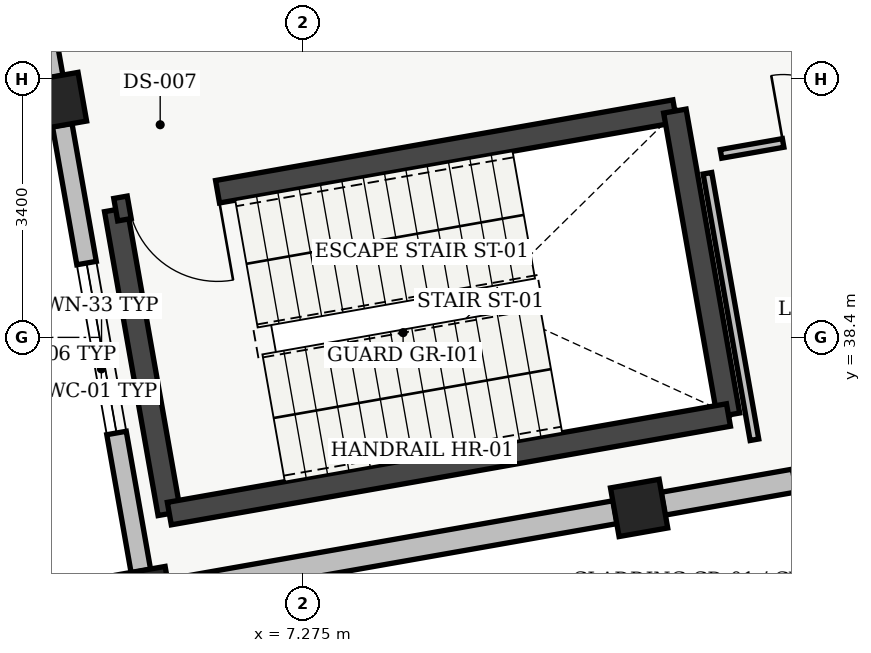
"""IFC4 building model, lengths in metres.
Left out: names, types, materials, properties, quantities, classifications, styles, units other than length and angle.
Written with IfcOpenShell. Run it as: python <this file> out.ifc"""

import sys

from ifc_helpers import new_model, si_unit, direction, frame, frame_2d, origin, origin_2d, place, context, subcontext, project, spatial, rectangle, extrude, element, fill, save


model = new_model("IFC4")
c1 = context("Model", 3, precision=1e-05, world=origin(), true_north=direction((0.0, 1.0)))
c2 = subcontext(c1, "Body", "Model", "MODEL_VIEW")
j1 = project(units=[si_unit("LENGTHUNIT", "METRE"), si_unit("PLANEANGLEUNIT", "RADIAN")], contexts=[c1])
p1 = place(None, origin())
s1 = spatial("IfcSite", under=j1, at=p1, CompositionType="ELEMENT")
p2 = place(p1, origin())
s2 = spatial("IfcBuilding", under=s1, at=p2, CompositionType="ELEMENT")
p3 = place(p2, frame((0.0, 0.0, 23.1)))
s3 = spatial("IfcBuildingStorey", under=s2, at=p3, CompositionType="ELEMENT", Elevation=23.1)
for number, where, z_axis, x_axis in (
    (1, (5.2, 35.01, 0.0), (0.0, 0.0, 1.0), (0.985, 0.174, 0.0)),
    (2, (4.054, 41.51, 0.0), (0.0, 0.0, 1.0), (0.985, 0.174, 0.0)),
    (3, (11.7, 36.156, 0.0), (0.0, 0.0, 1.0), (0.985, 0.174, 0.0)),
):
    element("IfcColumn", number, at=place(p3, frame(where, z_axis=z_axis, x_axis=x_axis)), inside=s3, PredefinedType="COLUMN", context=c2, shape_type="SweptSolid", body=[
        extrude(rectangle(XDim=0.65, YDim=0.65, at=origin_2d()), origin(), (0.0, 0.0, 1.0), 4.31),
    ])
p4 = place(p3, frame((5.145, 35.325, 0.0), z_axis=(0.0, 0.0, 1.0), x_axis=(-0.17368484894, 0.984801286173, 0.0)))
e4 = element("IfcWall", 4, at=p4, inside=s3, PredefinedType="STANDARD", context=c2, shape_type="SweptSolid", body=[
    extrude(rectangle(XDim=5.96, YDim=0.26, at=frame_2d((2.98, 0.0))), origin(), (0.0, 0.0, 1.0), 3.795),
])
p5 = place(p4, frame((1.845, 0.0, 0.95)))
e5 = element("IfcOpeningElement", 5, at=p5, cuts=e4, PredefinedType="OPENING", context=c2, shape_type="SweptSolid", body=[
    extrude(rectangle(XDim=2.27, YDim=1.48, at=frame_2d((1.135, 0.74))), frame((0.0, 0.13, 0.0), z_axis=(0.0, -1.0, 0.0), x_axis=(1.0, 0.0, 0.0)), (0.0, 0.0, 1.0), 0.26),
])
p6 = place(p3, frame((3.998, 41.825, 0.0), z_axis=(0.0, 0.0, 1.0), x_axis=(-0.173645120828, 0.98480829201, 0.0)))
e6 = element("IfcWall", 6, at=p6, inside=s3, PredefinedType="STANDARD", context=c2, shape_type="SweptSolid", body=[
    extrude(rectangle(XDim=5.96, YDim=0.245, at=frame_2d((2.98, 0.0))), origin(), (0.0, 0.0, 1.0), 3.795),
])
p7 = place(p6, frame((1.8, 0.0, 0.95)))
e7 = element("IfcOpeningElement", 7, at=p7, cuts=e6, PredefinedType="OPENING", context=c2, shape_type="SweptSolid", body=[
    extrude(rectangle(XDim=2.36, YDim=1.36, at=frame_2d((1.18, 0.68))), frame((0.0, 0.123, 0.0), z_axis=(0.0, -1.0, 0.0), x_axis=(1.0, 0.0, 0.0)), (0.0, 0.0, 1.0), 0.245),
])
p8 = place(p3, frame((17.884, 37.247, 0.0), z_axis=(0.0, 0.0, 1.0), x_axis=(-0.98480829201, -0.173645120828, 0.0)))
e8 = element("IfcWall", 8, at=p8, inside=s3, PredefinedType="STANDARD", context=c2, shape_type="SweptSolid", body=[
    extrude(rectangle(XDim=5.96, YDim=0.305, at=frame_2d((2.98, 0.0))), origin(), (0.0, 0.0, 1.0), 3.795),
])
p9 = place(p8, frame((1.755, 0.0, 0.95)))
e9 = element("IfcOpeningElement", 9, at=p9, cuts=e8, PredefinedType="OPENING", context=c2, shape_type="SweptSolid", body=[
    extrude(rectangle(XDim=2.45, YDim=1.38, at=frame_2d((1.225, 0.69))), frame((0.0, 0.152, 0.0), z_axis=(0.0, -1.0, 0.0), x_axis=(1.0, 0.0, 0.0)), (0.0, 0.0, 1.0), 0.305),
])
p10 = place(p3, frame((11.385, 36.101, 0.0), z_axis=(0.0, 0.0, 1.0), x_axis=(-0.98480829201, -0.173645120828, 0.0)))
e10 = element("IfcWall", 10, at=p10, inside=s3, PredefinedType="STANDARD", context=c2, shape_type="SweptSolid", body=[
    extrude(rectangle(XDim=5.96, YDim=0.305, at=frame_2d((2.98, 0.0))), origin(), (0.0, 0.0, 1.0), 3.795),
])
p11 = place(p3, frame((5.519, 36.082, 0.0), z_axis=(0.0, 0.0, 1.0), x_axis=(-0.173665267602, 0.984804739443, 0.0)))
e11 = element("IfcWall", 11, at=p11, inside=s3, PredefinedType="SHEAR", context=c2, shape_type="SweptSolid", body=[
    extrude(rectangle(XDim=4.06, YDim=0.3, at=frame_2d((2.03, 0.0))), origin(), (0.0, 0.0, 1.0), 4.28),
])
p12 = place(p3, frame((4.814, 40.08, 0.0), z_axis=(0.0, 0.0, 1.0), x_axis=(0.984802636214, 0.173677193974, 0.0)))
e12 = element("IfcWall", 12, at=p12, inside=s3, PredefinedType="SHEAR", context=c2, shape_type="SweptSolid", body=[
    extrude(rectangle(XDim=7.47, YDim=0.3, at=frame_2d((3.735, 0.0))), origin(), (0.0, 0.0, 1.0), 4.28),
])
p13 = place(p12, frame((0.18, 0.0, 0.0)))
e13 = element("IfcOpeningElement", 13, at=p13, cuts=e12, PredefinedType="OPENING", context=c2, shape_type="SweptSolid", body=[
    extrude(rectangle(XDim=1.18, YDim=2.15, at=frame_2d((0.59, 1.075))), frame((0.0, 0.15, 0.0), z_axis=(0.0, -1.0, 0.0), x_axis=(1.0, 0.0, 0.0)), (0.0, 0.0, 1.0), 0.3),
])
p14 = place(p3, frame((12.17, 41.377, 0.0), z_axis=(0.0, 0.0, 1.0), x_axis=(0.173654983803, -0.984806552883, 0.0)))
e14 = element("IfcWall", 14, at=p14, inside=s3, PredefinedType="SHEAR", context=c2, shape_type="SweptSolid", body=[
    extrude(rectangle(XDim=4.06, YDim=0.3, at=frame_2d((2.03, 0.0))), origin(), (0.0, 0.0, 1.0), 4.28),
])
p15 = place(p3, frame((12.875, 37.379, 0.0), z_axis=(0.0, 0.0, 1.0), x_axis=(-0.984808225754, -0.173645496596, 0.0)))
e15 = element("IfcWall", 15, at=p15, inside=s3, PredefinedType="SHEAR", context=c2, shape_type="SweptSolid", body=[
    extrude(rectangle(XDim=7.47, YDim=0.3, at=frame_2d((3.735, 0.0))), origin(), (0.0, 0.0, 1.0), 4.28),
])
p16 = place(p3, frame((15.298, 41.259, 0.0), z_axis=(0.0, 0.0, 1.0), x_axis=(-0.984803714572, -0.17367107924, 0.0)))
e16 = element("IfcWall", 16, at=p16, inside=s3, PredefinedType="PARTITIONING", context=c2, shape_type="SweptSolid", body=[
    extrude(rectangle(XDim=2.56, YDim=0.115, at=frame_2d((1.28, 0.0))), origin(), (0.0, 0.0, 1.0), 3.95),
])
p17 = place(p16, frame((0.83, 0.0, 0.0)))
e17 = element("IfcOpeningElement", 17, at=p17, cuts=e16, PredefinedType="OPENING", context=c2, shape_type="SweptSolid", body=[
    extrude(rectangle(XDim=0.9, YDim=2.1, at=frame_2d((0.45, 1.05))), frame((0.0, 0.058, 0.0), z_axis=(0.0, -1.0, 0.0), x_axis=(1.0, 0.0, 0.0)), (0.0, 0.0, 1.0), 0.115),
])
p18 = place(p3, frame((12.599, 40.559, 0.0), z_axis=(0.0, 0.0, 1.0), x_axis=(0.173644490041, -0.984808403233, 0.0)))
e18 = element("IfcWall", 18, at=p18, inside=s3, PredefinedType="PARTITIONING", context=c2, shape_type="SweptSolid", body=[
    extrude(rectangle(XDim=3.56, YDim=0.115, at=frame_2d((1.78, 0.0))), origin(), (0.0, 0.0, 1.0), 3.95),
])
p19 = place(p5, origin())
e19 = element("IfcWindow", 19, at=p19, inside=s3, PartitioningType="SINGLE_PANEL", PredefinedType="WINDOW", context=c2, shape_type="SweptSolid", body=[
    extrude(rectangle(XDim=2.27, YDim=1.48, at=frame_2d((1.135, 0.74))), frame((0.0, 0.03, 0.0), z_axis=(0.0, -1.0, 0.0), x_axis=(1.0, 0.0, 0.0)), (0.0, 0.0, 1.0), 0.06),
])
fill(e5, e19)
p20 = place(p13, origin())
e20 = element("IfcDoor", 20, at=p20, inside=s3, OperationType="SINGLE_SWING_RIGHT", PredefinedType="DOOR", context=c2, shape_type="SweptSolid", body=[
    extrude(rectangle(XDim=1.18, YDim=2.15, at=frame_2d((0.59, 1.075))), frame((0.0, 0.025, 0.0), z_axis=(0.0, -1.0, 0.0), x_axis=(1.0, 0.0, 0.0)), (0.0, 0.0, 1.0), 0.05),
])
fill(e13, e20)
p21 = place(p17, origin())
e21 = element("IfcDoor", 21, at=p21, inside=s3, OperationType="SINGLE_SWING_RIGHT", PredefinedType="DOOR", context=c2, shape_type="SweptSolid", body=[
    extrude(rectangle(XDim=0.9, YDim=2.1, at=frame_2d((0.45, 1.05))), frame((0.0, 0.025, 0.0), z_axis=(0.0, -1.0, 0.0), x_axis=(1.0, 0.0, 0.0)), (0.0, 0.0, 1.0), 0.05),
])
fill(e17, e21)
save(model, sys.argv[1])
